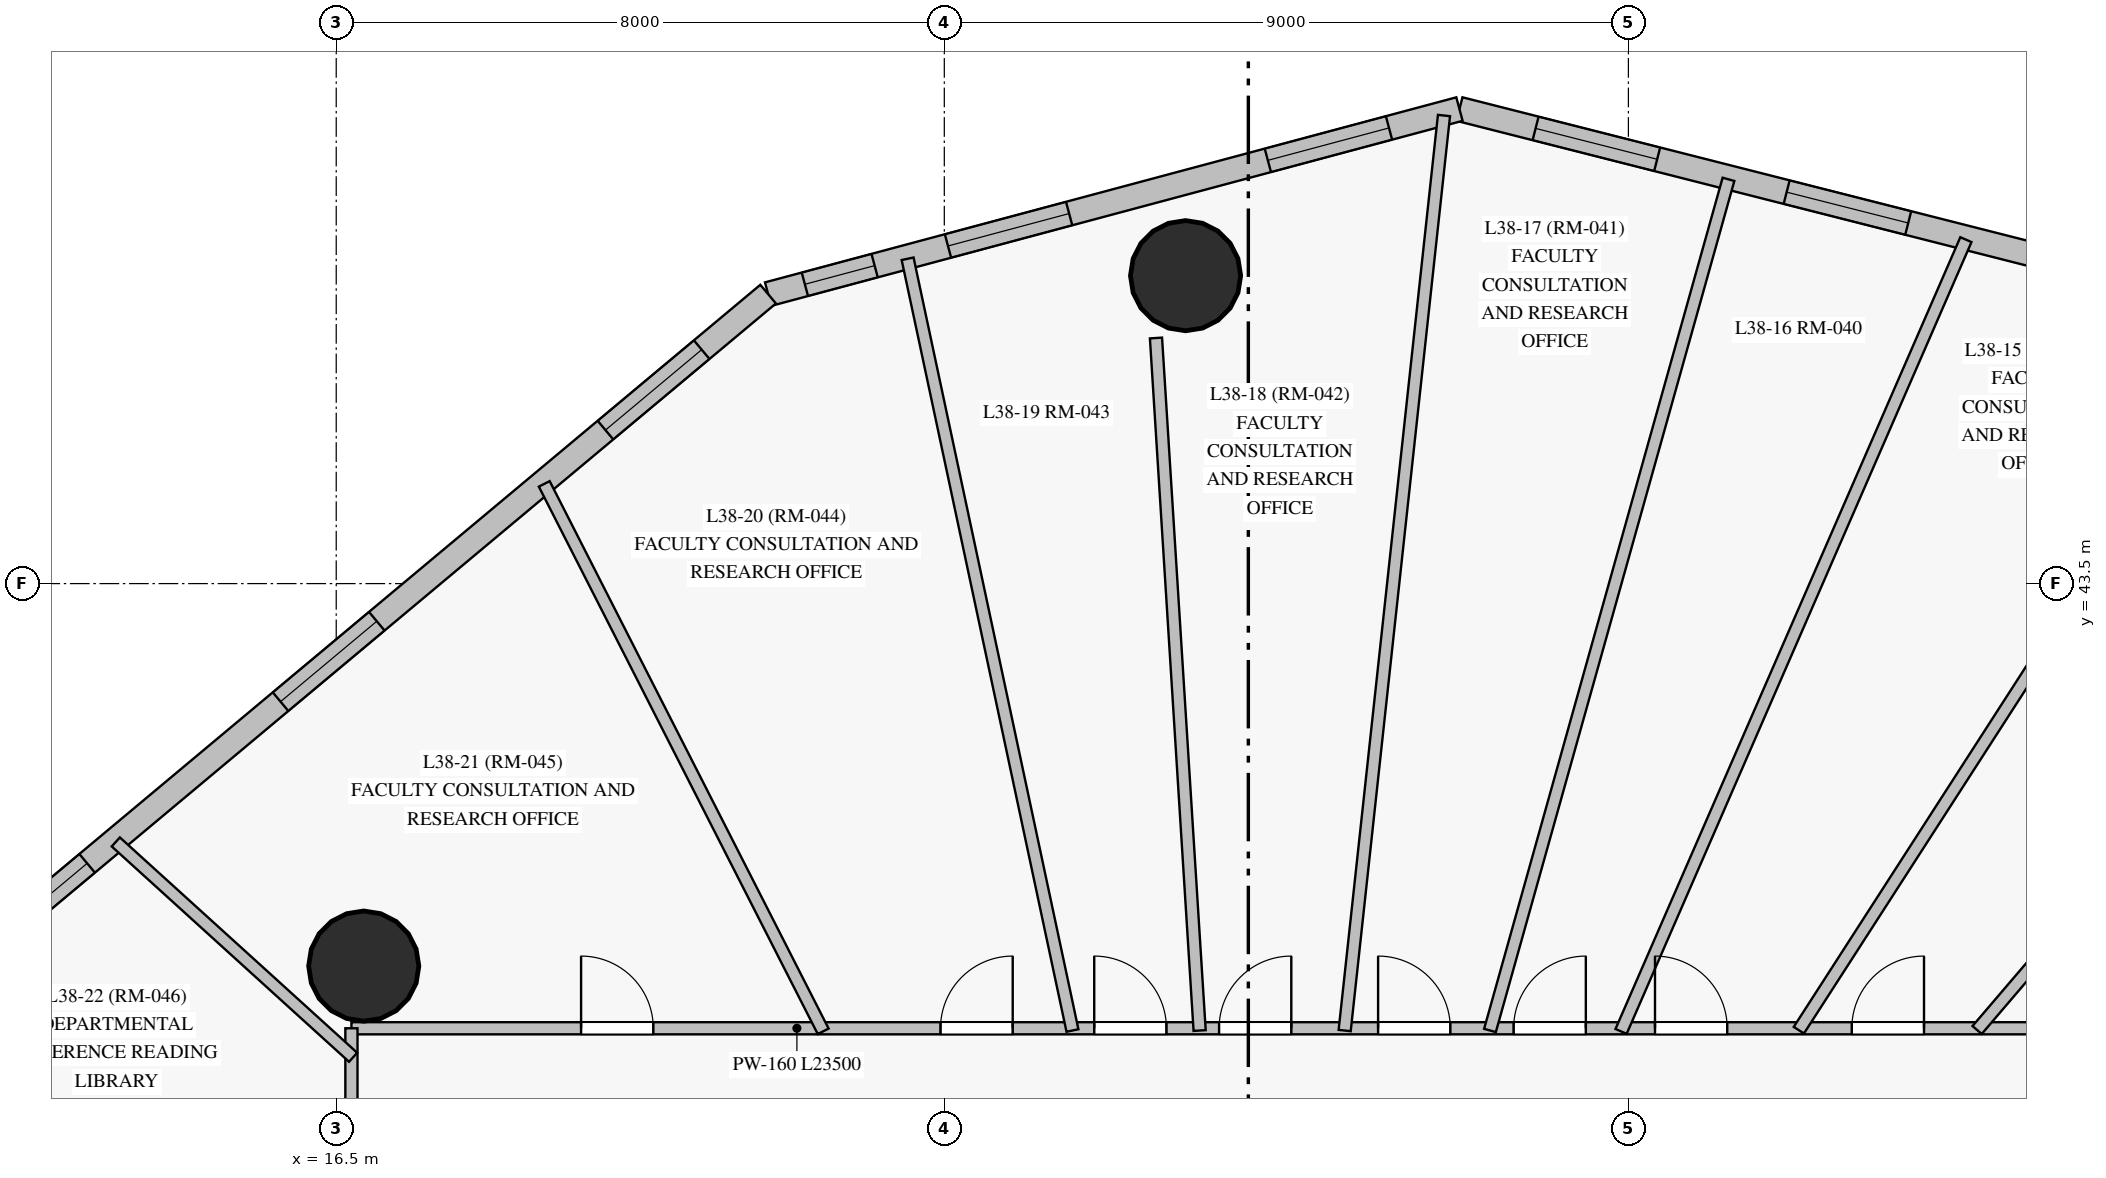
"""IFC4 building model, lengths in metres.
Left out: names, types, materials, properties, quantities, classifications, styles, units other than length and angle.
Written with IfcOpenShell. Run it as: python <this file> out.ifc"""

import sys

from ifc_helpers import new_model, si_unit, direction, frame, frame_2d, origin, origin_with_axes, origin_2d, place, context, subcontext, project, spatial, rectangle, circle, extrude, source, transform, mapped, element, fill, save


model = new_model("IFC4")
c1 = context("Model", 3, precision=1e-05, world=origin(), true_north=direction((0.0, 1.0)))
c2 = subcontext(c1, "Body", "Model", "MODEL_VIEW")
j1 = project(units=[si_unit("LENGTHUNIT", "METRE"), si_unit("PLANEANGLEUNIT", "RADIAN")], contexts=[c1])
p1 = place(None, origin())
s1 = spatial("IfcSite", under=j1, at=p1, CompositionType="ELEMENT")
p2 = place(p1, origin())
s2 = spatial("IfcBuilding", under=s1, at=p2, CompositionType="ELEMENT")
p3 = place(p2, frame((0.0, 0.0, 135.85)))
s3 = spatial("IfcBuildingStorey", under=s2, at=p3, CompositionType="ELEMENT", Elevation=135.85)
m1 = source(origin_with_axes(), c2, "Body", "SweptSolid", [
    extrude(circle(Radius=0.725, at=origin_2d()), origin(), (0.0, 0.0, 1.0), 3.05),
])
for number, where, z_axis, x_axis in (
    (1, (27.674, 47.551, 0.0), (0.0, 0.0, 1.0), (1.0, 0.0, 0.0)),
    (2, (16.862, 38.468, 0.0), (0.0, 0.0, 1.0), (1.0, 0.0, 0.0)),
):
    element("IfcColumn", number, at=place(p3, frame(where, z_axis=z_axis, x_axis=x_axis)), inside=s3, PredefinedType="COLUMN", context=c2, shape_type="MappedRepresentation", body=[
        mapped(m1, transform((0.0, 0.0, 0.0), scale=1.0)),
    ])
p4 = place(p3, frame((42.654, 46.855, 0.0), z_axis=(0.0, 0.0, 1.0), x_axis=(-0.969260142648, 0.246038159386, 0.0)))
e3 = element("IfcWall", 3, at=p4, inside=s3, PredefinedType="SOLIDWALL", context=c2, shape_type="SweptSolid", body=[
    extrude(rectangle(XDim=11.738, YDim=0.32, at=frame_2d((5.869, 0.0))), origin(), (0.0, 0.0, 1.0), 2.825),
])
p5 = place(p4, frame((2.043, 0.0, 0.85)))
e4 = element("IfcOpeningElement", 4, at=p5, cuts=e3, PredefinedType="OPENING", context=c2, shape_type="SweptSolid", body=[
    extrude(rectangle(XDim=1.65, YDim=1.65, at=frame_2d((0.825, 0.825))), frame((0.0, 0.17, 0.0), z_axis=(0.0, -1.0, 0.0), x_axis=(1.0, 0.0, 0.0)), (0.0, 0.0, 1.0), 0.34),
])
p6 = place(p4, frame((5.646, 0.0, 0.85)))
e5 = element("IfcOpeningElement", 5, at=p6, cuts=e3, PredefinedType="OPENING", context=c2, shape_type="SweptSolid", body=[
    extrude(rectangle(XDim=1.65, YDim=1.65, at=frame_2d((0.825, 0.825))), frame((0.0, 0.17, 0.0), z_axis=(0.0, -1.0, 0.0), x_axis=(1.0, 0.0, 0.0)), (0.0, 0.0, 1.0), 0.34),
])
p7 = place(p4, frame((9.054, 0.0, 0.85)))
e6 = element("IfcOpeningElement", 6, at=p7, cuts=e3, PredefinedType="OPENING", context=c2, shape_type="SweptSolid", body=[
    extrude(rectangle(XDim=1.65, YDim=1.65, at=frame_2d((0.825, 0.825))), frame((0.0, 0.17, 0.0), z_axis=(0.0, -1.0, 0.0), x_axis=(1.0, 0.0, 0.0)), (0.0, 0.0, 1.0), 0.34),
])
p8 = place(p3, frame((31.277, 49.743, 0.0), z_axis=(0.0, 0.0, 1.0), x_axis=(-0.965991781353, -0.258572771881, 0.0)))
e7 = element("IfcWall", 7, at=p8, inside=s3, PredefinedType="SOLIDWALL", context=c2, shape_type="SweptSolid", body=[
    extrude(rectangle(XDim=9.416, YDim=0.32, at=frame_2d((4.708, 0.0))), origin(), (0.0, 0.0, 1.0), 2.825),
])
p9 = place(p8, frame((0.959, 0.0, 0.85)))
e8 = element("IfcOpeningElement", 8, at=p9, cuts=e7, PredefinedType="OPENING", context=c2, shape_type="SweptSolid", body=[
    extrude(rectangle(XDim=1.65, YDim=1.65, at=frame_2d((0.825, 0.825))), frame((0.0, 0.17, 0.0), z_axis=(0.0, -1.0, 0.0), x_axis=(1.0, 0.0, 0.0)), (0.0, 0.0, 1.0), 0.34),
])
p10 = place(p8, frame((5.316, 0.0, 0.85)))
e9 = element("IfcOpeningElement", 9, at=p10, cuts=e7, PredefinedType="OPENING", context=c2, shape_type="SweptSolid", body=[
    extrude(rectangle(XDim=1.65, YDim=1.65, at=frame_2d((0.825, 0.825))), frame((0.0, 0.17, 0.0), z_axis=(0.0, -1.0, 0.0), x_axis=(1.0, 0.0, 0.0)), (0.0, 0.0, 1.0), 0.34),
])
p11 = place(p8, frame((7.965, 0.0, 0.85)))
e10 = element("IfcOpeningElement", 10, at=p11, cuts=e7, PredefinedType="OPENING", context=c2, shape_type="SweptSolid", body=[
    extrude(rectangle(XDim=0.95, YDim=1.5, at=frame_2d((0.475, 0.75))), frame((0.0, 0.17, 0.0), z_axis=(0.0, -1.0, 0.0), x_axis=(1.0, 0.0, 0.0)), (0.0, 0.0, 1.0), 0.34),
])
p12 = place(p3, frame((22.182, 47.308, 0.0), z_axis=(0.0, 0.0, 1.0), x_axis=(-0.767264774206, -0.641330465722, 0.0)))
e11 = element("IfcWall", 11, at=p12, inside=s3, PredefinedType="SOLIDWALL", context=c2, shape_type="SweptSolid", body=[
    extrude(rectangle(XDim=13.611, YDim=0.32, at=frame_2d((6.806, 0.0))), origin(), (0.0, 0.0, 1.0), 2.825),
])
p13 = place(p12, frame((1.139, 0.0, 0.85)))
e12 = element("IfcOpeningElement", 12, at=p13, cuts=e11, PredefinedType="OPENING", context=c2, shape_type="SweptSolid", body=[
    extrude(rectangle(XDim=1.65, YDim=1.65, at=frame_2d((0.825, 0.825))), frame((0.0, 0.17, 0.0), z_axis=(0.0, -1.0, 0.0), x_axis=(1.0, 0.0, 0.0)), (0.0, 0.0, 1.0), 0.34),
])
p14 = place(p12, frame((6.71, 0.0, 0.85)))
e13 = element("IfcOpeningElement", 13, at=p14, cuts=e11, PredefinedType="OPENING", context=c2, shape_type="SweptSolid", body=[
    extrude(rectangle(XDim=1.65, YDim=1.65, at=frame_2d((0.825, 0.825))), frame((0.0, 0.17, 0.0), z_axis=(0.0, -1.0, 0.0), x_axis=(1.0, 0.0, 0.0)), (0.0, 0.0, 1.0), 0.34),
])
p15 = place(p12, frame((11.677, 0.0, 0.85)))
e14 = element("IfcOpeningElement", 14, at=p15, cuts=e11, PredefinedType="OPENING", context=c2, shape_type="SweptSolid", body=[
    extrude(rectangle(XDim=1.4, YDim=1.65, at=frame_2d((0.7, 0.825))), frame((0.0, 0.17, 0.0), z_axis=(0.0, -1.0, 0.0), x_axis=(1.0, 0.0, 0.0)), (0.0, 0.0, 1.0), 0.34),
])
p16 = place(p3, frame((16.7, 37.65, 0.0), z_axis=(0.0, 0.0, 1.0), x_axis=(1.0, 0.0, 0.0)))
e15 = element("IfcWall", 15, at=p16, inside=s3, PredefinedType="PARTITIONING", context=c2, shape_type="SweptSolid", body=[
    extrude(rectangle(XDim=23.5, YDim=0.16, at=frame_2d((11.75, 0.0))), origin(), (0.0, 0.0, 1.0), 2.325),
])
p17 = place(p16, frame((22.193, 0.0, 0.0)))
e16 = element("IfcOpeningElement", 16, at=p17, cuts=e15, PredefinedType="OPENING", context=c2, shape_type="SweptSolid", body=[
    extrude(rectangle(XDim=0.95, YDim=2.15, at=frame_2d((0.475, 1.075))), frame((0.0, 0.09, 0.0), z_axis=(0.0, -1.0, 0.0), x_axis=(1.0, 0.0, 0.0)), (0.0, 0.0, 1.0), 0.18),
])
p18 = place(p16, frame((19.739, 0.0, 0.0)))
e17 = element("IfcOpeningElement", 17, at=p18, cuts=e15, PredefinedType="OPENING", context=c2, shape_type="SweptSolid", body=[
    extrude(rectangle(XDim=0.95, YDim=2.15, at=frame_2d((0.475, 1.075))), frame((0.0, 0.09, 0.0), z_axis=(0.0, -1.0, 0.0), x_axis=(1.0, 0.0, 0.0)), (0.0, 0.0, 1.0), 0.18),
])
p19 = place(p16, frame((17.15, 0.0, 0.0)))
e18 = element("IfcOpeningElement", 18, at=p19, cuts=e15, PredefinedType="OPENING", context=c2, shape_type="SweptSolid", body=[
    extrude(rectangle(XDim=0.95, YDim=2.15, at=frame_2d((0.475, 1.075))), frame((0.0, 0.09, 0.0), z_axis=(0.0, -1.0, 0.0), x_axis=(1.0, 0.0, 0.0)), (0.0, 0.0, 1.0), 0.18),
])
p20 = place(p16, frame((15.29, 0.0, 0.0)))
e19 = element("IfcOpeningElement", 19, at=p20, cuts=e15, PredefinedType="OPENING", context=c2, shape_type="SweptSolid", body=[
    extrude(rectangle(XDim=0.95, YDim=2.15, at=frame_2d((0.475, 1.075))), frame((0.0, 0.09, 0.0), z_axis=(0.0, -1.0, 0.0), x_axis=(1.0, 0.0, 0.0)), (0.0, 0.0, 1.0), 0.18),
])
p21 = place(p16, frame((13.507, 0.0, 0.0)))
e20 = element("IfcOpeningElement", 20, at=p21, cuts=e15, PredefinedType="OPENING", context=c2, shape_type="SweptSolid", body=[
    extrude(rectangle(XDim=0.95, YDim=2.15, at=frame_2d((0.475, 1.075))), frame((0.0, 0.09, 0.0), z_axis=(0.0, -1.0, 0.0), x_axis=(1.0, 0.0, 0.0)), (0.0, 0.0, 1.0), 0.18),
])
p22 = place(p16, frame((11.415, 0.0, 0.0)))
e21 = element("IfcOpeningElement", 21, at=p22, cuts=e15, PredefinedType="OPENING", context=c2, shape_type="SweptSolid", body=[
    extrude(rectangle(XDim=0.95, YDim=2.15, at=frame_2d((0.475, 1.075))), frame((0.0, 0.09, 0.0), z_axis=(0.0, -1.0, 0.0), x_axis=(1.0, 0.0, 0.0)), (0.0, 0.0, 1.0), 0.18),
])
p23 = place(p16, frame((9.772, 0.0, 0.0)))
e22 = element("IfcOpeningElement", 22, at=p23, cuts=e15, PredefinedType="OPENING", context=c2, shape_type="SweptSolid", body=[
    extrude(rectangle(XDim=0.95, YDim=2.15, at=frame_2d((0.475, 1.075))), frame((0.0, 0.09, 0.0), z_axis=(0.0, -1.0, 0.0), x_axis=(1.0, 0.0, 0.0)), (0.0, 0.0, 1.0), 0.18),
])
p24 = place(p16, frame((7.75, 0.0, 0.0)))
e23 = element("IfcOpeningElement", 23, at=p24, cuts=e15, PredefinedType="OPENING", context=c2, shape_type="SweptSolid", body=[
    extrude(rectangle(XDim=0.95, YDim=2.15, at=frame_2d((0.475, 1.075))), frame((0.0, 0.09, 0.0), z_axis=(0.0, -1.0, 0.0), x_axis=(1.0, 0.0, 0.0)), (0.0, 0.0, 1.0), 0.18),
])
p25 = place(p16, frame((3.021, 0.0, 0.0)))
e24 = element("IfcOpeningElement", 24, at=p25, cuts=e15, PredefinedType="OPENING", context=c2, shape_type="SweptSolid", body=[
    extrude(rectangle(XDim=0.95, YDim=2.15, at=frame_2d((0.475, 1.075))), frame((0.0, 0.09, 0.0), z_axis=(0.0, -1.0, 0.0), x_axis=(1.0, 0.0, 0.0)), (0.0, 0.0, 1.0), 0.18),
])
p26 = place(p3, frame((16.7, 15.35, 0.0), z_axis=(0.0, 0.0, 1.0), x_axis=(0.0, 1.0, 0.0)))
e25 = element("IfcWall", 25, at=p26, inside=s3, PredefinedType="PARTITIONING", context=c2, shape_type="SweptSolid", body=[
    extrude(rectangle(XDim=22.3, YDim=0.16, at=frame_2d((11.15, 0.0))), origin(), (0.0, 0.0, 1.0), 2.225),
])
p27 = place(p26, frame((7.33, 0.0, 0.0)))
e26 = element("IfcOpeningElement", 26, at=p27, cuts=e25, PredefinedType="OPENING", context=c2, shape_type="SweptSolid", body=[
    extrude(rectangle(XDim=0.95, YDim=2.15, at=frame_2d((0.475, 1.075))), frame((0.0, 0.09, 0.0), z_axis=(0.0, -1.0, 0.0), x_axis=(1.0, 0.0, 0.0)), (0.0, 0.0, 1.0), 0.18),
])
p28 = place(p26, frame((3.903, 0.0, 0.0)))
e27 = element("IfcOpeningElement", 27, at=p28, cuts=e25, PredefinedType="OPENING", context=c2, shape_type="SweptSolid", body=[
    extrude(rectangle(XDim=0.96, YDim=2.15, at=frame_2d((0.48, 1.075))), frame((0.0, 0.09, 0.0), z_axis=(0.0, -1.0, 0.0), x_axis=(1.0, 0.0, 0.0)), (0.0, 0.0, 1.0), 0.18),
])
p29 = place(p26, frame((18.341, 0.0, 0.0)))
e28 = element("IfcOpeningElement", 28, at=p29, cuts=e25, PredefinedType="OPENING", context=c2, shape_type="SweptSolid", body=[
    extrude(rectangle(XDim=0.95, YDim=2.15, at=frame_2d((0.475, 1.075))), frame((0.0, 0.09, 0.0), z_axis=(0.0, -1.0, 0.0), x_axis=(1.0, 0.0, 0.0)), (0.0, 0.0, 1.0), 0.18),
])
p30 = place(p26, frame((14.02, 0.0, 0.0)))
e29 = element("IfcOpeningElement", 29, at=p30, cuts=e25, PredefinedType="OPENING", context=c2, shape_type="SweptSolid", body=[
    extrude(rectangle(XDim=0.95, YDim=2.15, at=frame_2d((0.475, 1.075))), frame((0.0, 0.09, 0.0), z_axis=(0.0, -1.0, 0.0), x_axis=(1.0, 0.0, 0.0)), (0.0, 0.0, 1.0), 0.18),
])
p31 = place(p26, frame((10.675, 0.0, 0.0)))
e30 = element("IfcOpeningElement", 30, at=p31, cuts=e25, PredefinedType="OPENING", context=c2, shape_type="SweptSolid", body=[
    extrude(rectangle(XDim=0.95, YDim=2.15, at=frame_2d((0.475, 1.075))), frame((0.0, 0.09, 0.0), z_axis=(0.0, -1.0, 0.0), x_axis=(1.0, 0.0, 0.0)), (0.0, 0.0, 1.0), 0.18),
])
p32 = place(p3, frame((29.767, 37.62, 0.0), z_axis=(0.0, 0.0, 1.0), x_axis=(0.107890663783, 0.994162765682, 0.0)))
e31 = element("IfcWall", 31, at=p32, inside=s3, PredefinedType="PARTITIONING", context=c2, shape_type="SweptSolid", body=[
    extrude(rectangle(XDim=12.109, YDim=0.16, at=frame_2d((6.054, 0.0))), origin(), (0.0, 0.0, 1.0), 2.825),
])
p33 = place(p3, frame((31.679, 37.621, 0.0), z_axis=(0.0, 0.0, 1.0), x_axis=(0.269840173921, 0.962905125409, 0.0)))
e32 = element("IfcWall", 32, at=p33, inside=s3, PredefinedType="PARTITIONING", context=c2, shape_type="SweptSolid", body=[
    extrude(rectangle(XDim=11.629, YDim=0.16, at=frame_2d((5.814, 0.0))), origin(), (0.0, 0.0, 1.0), 2.825),
])
p34 = place(p3, frame((33.404, 37.609, 0.0), z_axis=(0.0, 0.0, 1.0), x_axis=(0.399304349974, 0.916818431366, 0.0)))
e33 = element("IfcWall", 33, at=p34, inside=s3, PredefinedType="PARTITIONING", context=c2, shape_type="SweptSolid", body=[
    extrude(rectangle(XDim=11.361, YDim=0.16, at=frame_2d((5.681, 0.0))), origin(), (0.0, 0.0, 1.0), 2.825),
])
p35 = place(p3, frame((35.742, 37.625, 0.0), z_axis=(0.0, 0.0, 1.0), x_axis=(0.541798178904, 0.840508615861, 0.0)))
e34 = element("IfcWall", 34, at=p35, inside=s3, PredefinedType="PARTITIONING", context=c2, shape_type="SweptSolid", body=[
    extrude(rectangle(XDim=11.201, YDim=0.16, at=frame_2d((5.601, 0.0))), origin(), (0.0, 0.0, 1.0), 2.825),
])
p36 = place(p3, frame((26.186, 37.621, 0.0), z_axis=(0.0, 0.0, 1.0), x_axis=(-0.208893078631, 0.977938485642, 0.0)))
e35 = element("IfcWall", 35, at=p36, inside=s3, PredefinedType="PARTITIONING", context=c2, shape_type="SweptSolid", body=[
    extrude(rectangle(XDim=10.382, YDim=0.16, at=frame_2d((5.191, 0.0))), origin(), (0.0, 0.0, 1.0), 2.225),
])
p37 = place(p3, frame((38.088, 37.627, 0.0), z_axis=(0.0, 0.0, 1.0), x_axis=(0.649663413135, 0.760221973922, 0.0)))
e36 = element("IfcWall", 36, at=p37, inside=s3, PredefinedType="PARTITIONING", context=c2, shape_type="SweptSolid", body=[
    extrude(rectangle(XDim=9.257, YDim=0.16, at=frame_2d((4.628, 0.0))), origin(), (0.0, 0.0, 1.0), 2.825),
])
p38 = place(p3, frame((27.859, 37.62, 0.0), z_axis=(0.0, 0.0, 1.0), x_axis=(-0.062901079657, 0.998019766426, 0.0)))
e37 = element("IfcWall", 37, at=p38, inside=s3, PredefinedType="PARTITIONING", context=c2, shape_type="SweptSolid", body=[
    extrude(rectangle(XDim=9.129, YDim=0.16, at=frame_2d((4.564, 0.0))), origin(), (0.0, 0.0, 1.0), 2.225),
])
p39 = place(p3, frame((22.906, 37.61, 0.0), z_axis=(0.0, 0.0, 1.0), x_axis=(-0.453966502596, 0.891018750937, 0.0)))
e38 = element("IfcWall", 38, at=p39, inside=s3, PredefinedType="PARTITIONING", context=c2, shape_type="SweptSolid", body=[
    extrude(rectangle(XDim=8.083, YDim=0.16, at=frame_2d((4.042, 0.0))), origin(), (0.0, 0.0, 1.0), 2.825),
])
p40 = place(p3, frame((16.722, 37.268, 0.0), z_axis=(0.0, 0.0, 1.0), x_axis=(-0.740555502335, 0.671995199359, 0.0)))
e39 = element("IfcWall", 39, at=p40, inside=s3, PredefinedType="PARTITIONING", context=c2, shape_type="SweptSolid", body=[
    extrude(rectangle(XDim=4.216, YDim=0.16, at=frame_2d((2.108, 0.0))), origin(), (0.0, 0.0, 1.0), 2.825),
])
m2 = source(origin_with_axes(), c2, "Body", "SweptSolid", [
    extrude(rectangle(XDim=1.65, YDim=1.65, at=frame_2d((0.825, 0.825))), frame((0.0, 0.03, 0.0), z_axis=(0.0, -1.0, 0.0), x_axis=(1.0, 0.0, 0.0)), (0.0, 0.0, 1.0), 0.06),
])
p41 = place(p6, origin())
e40 = element("IfcWindow", 40, at=p41, inside=s3, PartitioningType="SINGLE_PANEL", PredefinedType="WINDOW", context=c2, shape_type="MappedRepresentation", body=[
    mapped(m2, transform((0.0, 0.0, 0.0), scale=1.0)),
])
fill(e5, e40)
p42 = place(p7, origin())
e41 = element("IfcWindow", 41, at=p42, inside=s3, PartitioningType="SINGLE_PANEL", PredefinedType="WINDOW", context=c2, shape_type="MappedRepresentation", body=[
    mapped(m2, transform((0.0, 0.0, 0.0), scale=1.0)),
])
fill(e6, e41)
p43 = place(p9, origin())
e42 = element("IfcWindow", 42, at=p43, inside=s3, PartitioningType="SINGLE_PANEL", PredefinedType="WINDOW", context=c2, shape_type="MappedRepresentation", body=[
    mapped(m2, transform((0.0, 0.0, 0.0), scale=1.0)),
])
fill(e8, e42)
p44 = place(p10, origin())
e43 = element("IfcWindow", 43, at=p44, inside=s3, PartitioningType="SINGLE_PANEL", PredefinedType="WINDOW", context=c2, shape_type="MappedRepresentation", body=[
    mapped(m2, transform((0.0, 0.0, 0.0), scale=1.0)),
])
fill(e9, e43)
m3 = source(origin_with_axes(), c2, "Body", "SweptSolid", [
    extrude(rectangle(XDim=0.95, YDim=1.5, at=frame_2d((0.475, 0.75))), frame((0.0, 0.03, 0.0), z_axis=(0.0, -1.0, 0.0), x_axis=(1.0, 0.0, 0.0)), (0.0, 0.0, 1.0), 0.06),
])
p45 = place(p11, origin())
e44 = element("IfcWindow", 44, at=p45, inside=s3, PartitioningType="SINGLE_PANEL", PredefinedType="WINDOW", context=c2, shape_type="MappedRepresentation", body=[
    mapped(m3, transform((0.0, 0.0, 0.0), scale=1.0)),
])
fill(e10, e44)
p46 = place(p13, origin())
e45 = element("IfcWindow", 45, at=p46, inside=s3, PartitioningType="SINGLE_PANEL", PredefinedType="WINDOW", context=c2, shape_type="MappedRepresentation", body=[
    mapped(m2, transform((0.0, 0.0, 0.0), scale=1.0)),
])
fill(e12, e45)
p47 = place(p14, origin())
e46 = element("IfcWindow", 46, at=p47, inside=s3, PartitioningType="SINGLE_PANEL", PredefinedType="WINDOW", context=c2, shape_type="MappedRepresentation", body=[
    mapped(m2, transform((0.0, 0.0, 0.0), scale=1.0)),
])
fill(e13, e46)
m4 = source(origin_with_axes(), c2, "Body", "SweptSolid", [
    extrude(rectangle(XDim=1.4, YDim=1.65, at=frame_2d((0.7, 0.825))), frame((0.0, 0.03, 0.0), z_axis=(0.0, -1.0, 0.0), x_axis=(1.0, 0.0, 0.0)), (0.0, 0.0, 1.0), 0.06),
])
p48 = place(p15, origin())
e47 = element("IfcWindow", 47, at=p48, inside=s3, PartitioningType="SINGLE_PANEL", PredefinedType="WINDOW", context=c2, shape_type="MappedRepresentation", body=[
    mapped(m4, transform((0.0, 0.0, 0.0), scale=1.0)),
])
fill(e14, e47)
m5 = source(origin_with_axes(), c2, "Body", "SweptSolid", [
    extrude(rectangle(XDim=0.95, YDim=2.15, at=frame_2d((0.475, 1.075))), frame((0.0, 0.025, 0.0), z_axis=(0.0, -1.0, 0.0), x_axis=(1.0, 0.0, 0.0)), (0.0, 0.0, 1.0), 0.05),
])
p49 = place(p18, origin())
e48 = element("IfcDoor", 48, at=p49, inside=s3, OperationType="SINGLE_SWING_RIGHT", PredefinedType="DOOR", context=c2, shape_type="MappedRepresentation", body=[
    mapped(m5, transform((0.0, 0.0, 0.0), scale=1.0)),
])
fill(e17, e48)
p50 = place(p19, origin())
e49 = element("IfcDoor", 49, at=p50, inside=s3, OperationType="SINGLE_SWING_LEFT", PredefinedType="DOOR", context=c2, shape_type="MappedRepresentation", body=[
    mapped(m5, transform((0.0, 0.0, 0.0), scale=1.0)),
])
fill(e18, e49)
p51 = place(p20, origin())
e50 = element("IfcDoor", 50, at=p51, inside=s3, OperationType="SINGLE_SWING_RIGHT", PredefinedType="DOOR", context=c2, shape_type="MappedRepresentation", body=[
    mapped(m5, transform((0.0, 0.0, 0.0), scale=1.0)),
])
fill(e19, e50)
p52 = place(p21, origin())
e51 = element("IfcDoor", 51, at=p52, inside=s3, OperationType="SINGLE_SWING_LEFT", PredefinedType="DOOR", context=c2, shape_type="MappedRepresentation", body=[
    mapped(m5, transform((0.0, 0.0, 0.0), scale=1.0)),
])
fill(e20, e51)
p53 = place(p22, origin())
e52 = element("IfcDoor", 52, at=p53, inside=s3, OperationType="SINGLE_SWING_RIGHT", PredefinedType="DOOR", context=c2, shape_type="MappedRepresentation", body=[
    mapped(m5, transform((0.0, 0.0, 0.0), scale=1.0)),
])
fill(e21, e52)
p54 = place(p23, origin())
e53 = element("IfcDoor", 53, at=p54, inside=s3, OperationType="SINGLE_SWING_LEFT", PredefinedType="DOOR", context=c2, shape_type="MappedRepresentation", body=[
    mapped(m5, transform((0.0, 0.0, 0.0), scale=1.0)),
])
fill(e22, e53)
p55 = place(p24, origin())
e54 = element("IfcDoor", 54, at=p55, inside=s3, OperationType="SINGLE_SWING_RIGHT", PredefinedType="DOOR", context=c2, shape_type="MappedRepresentation", body=[
    mapped(m5, transform((0.0, 0.0, 0.0), scale=1.0)),
])
fill(e23, e54)
p56 = place(p25, origin())
e55 = element("IfcDoor", 55, at=p56, inside=s3, OperationType="SINGLE_SWING_LEFT", PredefinedType="DOOR", context=c2, shape_type="MappedRepresentation", body=[
    mapped(m5, transform((0.0, 0.0, 0.0), scale=1.0)),
])
fill(e24, e55)
save(model, sys.argv[1])
